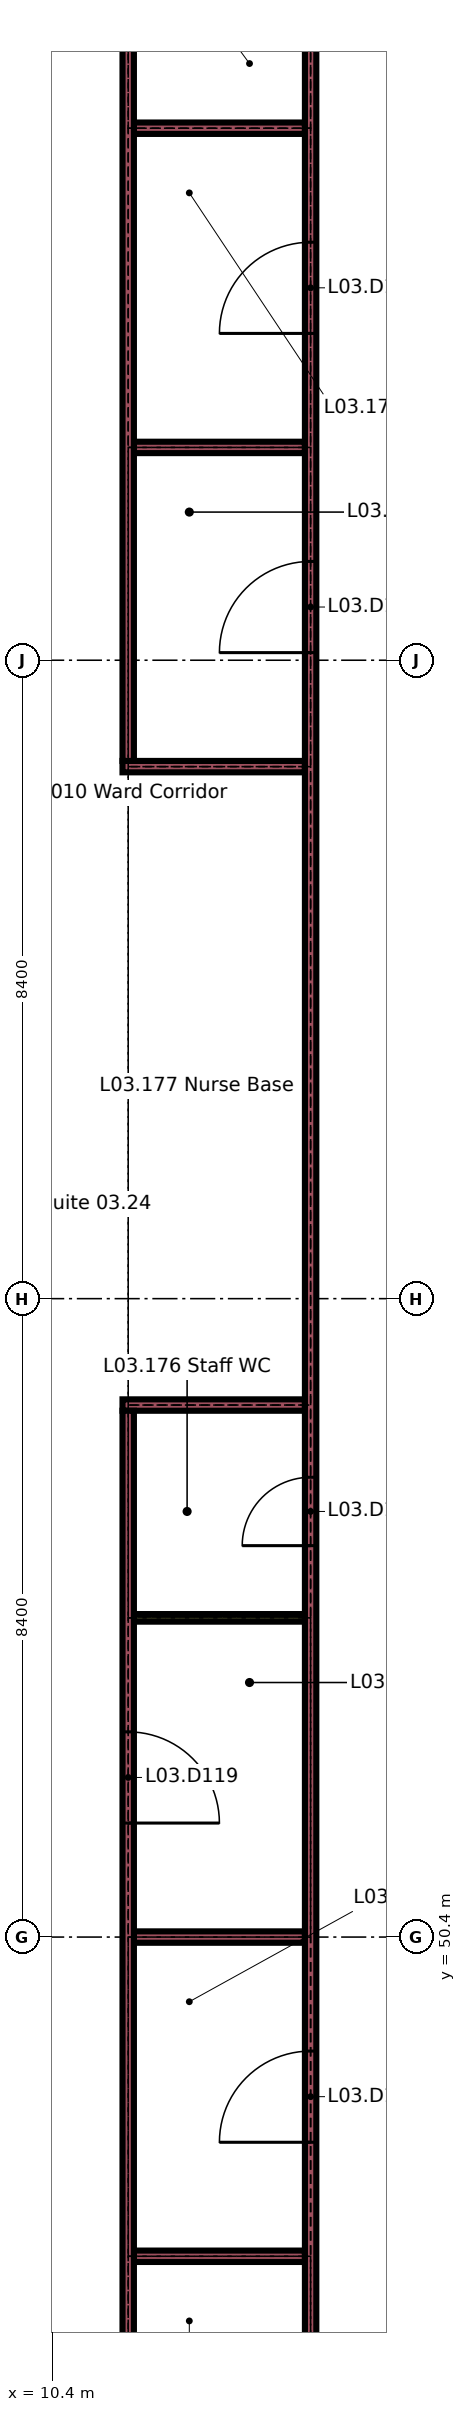
"""IFC4 building model, lengths in metres.
Left out: names, types, materials, properties, quantities, classifications, styles, units other than length and angle.
Written with IfcOpenShell. Run it as: python <this file> out.ifc"""

import sys

from ifc_helpers import new_model, si_unit, direction, frame, frame_2d, origin, place, context, subcontext, project, spatial, rectangle, extrude, element, fill, save


model = new_model("IFC4")
c1 = context("Model", 3, precision=1e-05, world=origin(), true_north=direction((0.0, 1.0)))
c2 = subcontext(c1, "Body", "Model", "MODEL_VIEW")
j1 = project(units=[si_unit("LENGTHUNIT", "METRE"), si_unit("PLANEANGLEUNIT", "RADIAN")], contexts=[c1])
p1 = place(None, origin())
s1 = spatial("IfcSite", under=j1, at=p1, CompositionType="ELEMENT")
p2 = place(p1, origin())
s2 = spatial("IfcBuilding", under=s1, at=p2, CompositionType="ELEMENT")
p3 = place(p2, frame((0.0, 0.0, 15.3)))
s3 = spatial("IfcBuildingStorey", under=s2, at=p3, CompositionType="ELEMENT", Elevation=15.3)
for number, where, z_axis, x_axis in (
    (1, (11.475, 46.2, 0.0), (0.0, 0.0, 1.0), (1.0, 0.0, 0.0)),
    (2, (11.475, 50.4, 0.0), (0.0, 0.0, 1.0), (1.0, 0.0, 0.0)),
):
    element("IfcWall", number, at=place(p3, frame(where, z_axis=z_axis, x_axis=x_axis)), inside=s3, PredefinedType="PARTITIONING", context=c2, shape_type="SweptSolid", body=[
        extrude(rectangle(XDim=2.25, YDim=0.15, at=frame_2d((1.125, 0.0))), origin(), (0.0, 0.0, 1.0), 3.26),
    ])
p4 = place(p3, frame((11.475, 54.6, 0.0), z_axis=(0.0, 0.0, 1.0), x_axis=(1.0, 0.0, 0.0)))
e3 = element("IfcWall", 3, at=p4, inside=s3, PredefinedType="PARTITIONING", context=c2, shape_type="SweptSolid", body=[
    extrude(rectangle(XDim=2.25, YDim=0.1, at=frame_2d((1.125, 0.0))), origin(), (0.0, 0.0, 1.0), 3.26),
])
for number, where, z_axis, x_axis in (
    (4, (11.325, 57.4, 0.0), (0.0, 0.0, 1.0), (1.0, 0.0, 0.0)),
    (5, (11.325, 65.8, 0.0), (0.0, 0.0, 1.0), (1.0, 0.0, 0.0)),
):
    element("IfcWall", number, at=place(p3, frame(where, z_axis=z_axis, x_axis=x_axis)), inside=s3, PredefinedType="PARTITIONING", context=c2, shape_type="SweptSolid", body=[
        extrude(rectangle(XDim=2.4, YDim=0.15, at=frame_2d((1.2, 0.0))), origin(), (0.0, 0.0, 1.0), 3.26),
    ])
for number, where, z_axis, x_axis in (
    (6, (11.475, 70.0, 0.0), (0.0, 0.0, 1.0), (1.0, 0.0, 0.0)),
    (7, (11.475, 74.2, 0.0), (0.0, 0.0, 1.0), (1.0, 0.0, 0.0)),
):
    element("IfcWall", number, at=place(p3, frame(where, z_axis=z_axis, x_axis=x_axis)), inside=s3, PredefinedType="PARTITIONING", context=c2, shape_type="SweptSolid", body=[
        extrude(rectangle(XDim=2.25, YDim=0.15, at=frame_2d((1.125, 0.0))), origin(), (0.0, 0.0, 1.0), 3.26),
    ])
p5 = place(p3, frame((11.4, 42.075, 0.0), z_axis=(0.0, 0.0, 1.0), x_axis=(0.0, 1.0, 0.0)))
e8 = element("IfcWall", 8, at=p5, inside=s3, PredefinedType="PARTITIONING", context=c2, shape_type="SweptSolid", body=[
    extrude(rectangle(XDim=15.25, YDim=0.15, at=frame_2d((7.625, 0.0))), origin(), (0.0, 0.0, 1.0), 3.26),
])
p6 = place(p5, frame((9.825, 0.0, 0.0)))
e9 = element("IfcOpeningElement", 9, at=p6, cuts=e8, PredefinedType="OPENING", context=c2, shape_type="SweptSolid", body=[
    extrude(rectangle(XDim=1.2, YDim=2.1, at=frame_2d((0.6, 1.05))), frame((0.0, 0.085, 0.0), z_axis=(0.0, -1.0, 0.0), x_axis=(1.0, 0.0, 0.0)), (0.0, 0.0, 1.0), 0.17),
])
p7 = place(p3, frame((11.4, 65.875, 0.0), z_axis=(0.0, 0.0, 1.0), x_axis=(0.0, 1.0, 0.0)))
e10 = element("IfcWall", 10, at=p7, inside=s3, PredefinedType="PARTITIONING", context=c2, shape_type="SweptSolid", body=[
    extrude(rectangle(XDim=15.25, YDim=0.15, at=frame_2d((7.625, 0.0))), origin(), (0.0, 0.0, 1.0), 3.26),
])
p8 = place(p7, frame((9.825, 0.0, 0.0)))
e11 = element("IfcOpeningElement", 11, at=p8, cuts=e10, PredefinedType="OPENING", context=c2, shape_type="SweptSolid", body=[
    extrude(rectangle(XDim=1.2, YDim=2.1, at=frame_2d((0.6, 1.05))), frame((0.0, 0.085, 0.0), z_axis=(0.0, -1.0, 0.0), x_axis=(1.0, 0.0, 0.0)), (0.0, 0.0, 1.0), 0.17),
])
p9 = place(p3, frame((13.8, 33.7, 0.0), z_axis=(0.0, 0.0, 1.0), x_axis=(0.0, 1.0, 0.0)))
e12 = element("IfcWall", 12, at=p9, inside=s3, PredefinedType="PARTITIONING", context=c2, shape_type="SweptSolid", body=[
    extrude(rectangle(XDim=50.2, YDim=0.15, at=frame_2d((25.1, 0.0))), origin(), (0.0, 0.0, 1.0), 3.26),
])
p10 = place(p9, frame((9.8, 0.0, 0.0)))
e13 = element("IfcOpeningElement", 13, at=p10, cuts=e12, PredefinedType="OPENING", context=c2, shape_type="SweptSolid", body=[
    extrude(rectangle(XDim=1.2, YDim=2.1, at=frame_2d((0.6, 1.05))), frame((0.0, 0.085, 0.0), z_axis=(0.0, -1.0, 0.0), x_axis=(1.0, 0.0, 0.0)), (0.0, 0.0, 1.0), 0.17),
])
p11 = place(p9, frame((14.0, 0.0, 0.0)))
e14 = element("IfcOpeningElement", 14, at=p11, cuts=e12, PredefinedType="OPENING", context=c2, shape_type="SweptSolid", body=[
    extrude(rectangle(XDim=1.2, YDim=2.1, at=frame_2d((0.6, 1.05))), frame((0.0, 0.085, 0.0), z_axis=(0.0, -1.0, 0.0), x_axis=(1.0, 0.0, 0.0)), (0.0, 0.0, 1.0), 0.17),
])
p12 = place(p9, frame((21.85, 0.0, 0.0)))
e15 = element("IfcOpeningElement", 15, at=p12, cuts=e12, PredefinedType="OPENING", context=c2, shape_type="SweptSolid", body=[
    extrude(rectangle(XDim=0.9, YDim=2.1, at=frame_2d((0.45, 1.05))), frame((0.0, 0.085, 0.0), z_axis=(0.0, -1.0, 0.0), x_axis=(1.0, 0.0, 0.0)), (0.0, 0.0, 1.0), 0.17),
])
p13 = place(p9, frame((33.6, 0.0, 0.0)))
e16 = element("IfcOpeningElement", 16, at=p13, cuts=e12, PredefinedType="OPENING", context=c2, shape_type="SweptSolid", body=[
    extrude(rectangle(XDim=1.2, YDim=2.1, at=frame_2d((0.6, 1.05))), frame((0.0, 0.085, 0.0), z_axis=(0.0, -1.0, 0.0), x_axis=(1.0, 0.0, 0.0)), (0.0, 0.0, 1.0), 0.17),
])
p14 = place(p9, frame((37.8, 0.0, 0.0)))
e17 = element("IfcOpeningElement", 17, at=p14, cuts=e12, PredefinedType="OPENING", context=c2, shape_type="SweptSolid", body=[
    extrude(rectangle(XDim=1.2, YDim=2.1, at=frame_2d((0.6, 1.05))), frame((0.0, 0.085, 0.0), z_axis=(0.0, -1.0, 0.0), x_axis=(1.0, 0.0, 0.0)), (0.0, 0.0, 1.0), 0.17),
])
p15 = place(p9, frame((45.65, 0.0, 0.0)))
e18 = element("IfcOpeningElement", 18, at=p15, cuts=e12, PredefinedType="OPENING", context=c2, shape_type="SweptSolid", body=[
    extrude(rectangle(XDim=0.9, YDim=2.1, at=frame_2d((0.45, 1.05))), frame((0.0, 0.085, 0.0), z_axis=(0.0, -1.0, 0.0), x_axis=(1.0, 0.0, 0.0)), (0.0, 0.0, 1.0), 0.17),
])
p16 = place(p6, origin())
e19 = element("IfcDoor", 19, at=p16, inside=s3, OperationType="SINGLE_SWING_LEFT", PredefinedType="DOOR", context=c2, shape_type="SweptSolid", body=[
    extrude(rectangle(XDim=1.2, YDim=2.1, at=frame_2d((0.6, 1.05))), frame((0.0, 0.025, 0.0), z_axis=(0.0, -1.0, 0.0), x_axis=(1.0, 0.0, 0.0)), (0.0, 0.0, 1.0), 0.05),
])
fill(e9, e19)
p17 = place(p11, origin())
e20 = element("IfcDoor", 20, at=p17, inside=s3, OperationType="SINGLE_SWING_RIGHT", PredefinedType="DOOR", context=c2, shape_type="SweptSolid", body=[
    extrude(rectangle(XDim=1.2, YDim=2.1, at=frame_2d((0.6, 1.05))), frame((0.0, 0.025, 0.0), z_axis=(0.0, -1.0, 0.0), x_axis=(1.0, 0.0, 0.0)), (0.0, 0.0, 1.0), 0.05),
])
fill(e14, e20)
p18 = place(p12, origin())
e21 = element("IfcDoor", 21, at=p18, inside=s3, OperationType="SINGLE_SWING_RIGHT", PredefinedType="DOOR", context=c2, shape_type="SweptSolid", body=[
    extrude(rectangle(XDim=0.9, YDim=2.1, at=frame_2d((0.45, 1.05))), frame((0.0, 0.02, 0.0), z_axis=(0.0, -1.0, 0.0), x_axis=(1.0, 0.0, 0.0)), (0.0, 0.0, 1.0), 0.04),
])
fill(e15, e21)
p19 = place(p13, origin())
e22 = element("IfcDoor", 22, at=p19, inside=s3, OperationType="SINGLE_SWING_RIGHT", PredefinedType="DOOR", context=c2, shape_type="SweptSolid", body=[
    extrude(rectangle(XDim=1.2, YDim=2.1, at=frame_2d((0.6, 1.05))), frame((0.0, 0.025, 0.0), z_axis=(0.0, -1.0, 0.0), x_axis=(1.0, 0.0, 0.0)), (0.0, 0.0, 1.0), 0.05),
])
fill(e16, e22)
p20 = place(p14, origin())
e23 = element("IfcDoor", 23, at=p20, inside=s3, OperationType="SINGLE_SWING_RIGHT", PredefinedType="DOOR", context=c2, shape_type="SweptSolid", body=[
    extrude(rectangle(XDim=1.2, YDim=2.1, at=frame_2d((0.6, 1.05))), frame((0.0, 0.025, 0.0), z_axis=(0.0, -1.0, 0.0), x_axis=(1.0, 0.0, 0.0)), (0.0, 0.0, 1.0), 0.05),
])
fill(e17, e23)
save(model, sys.argv[1])
